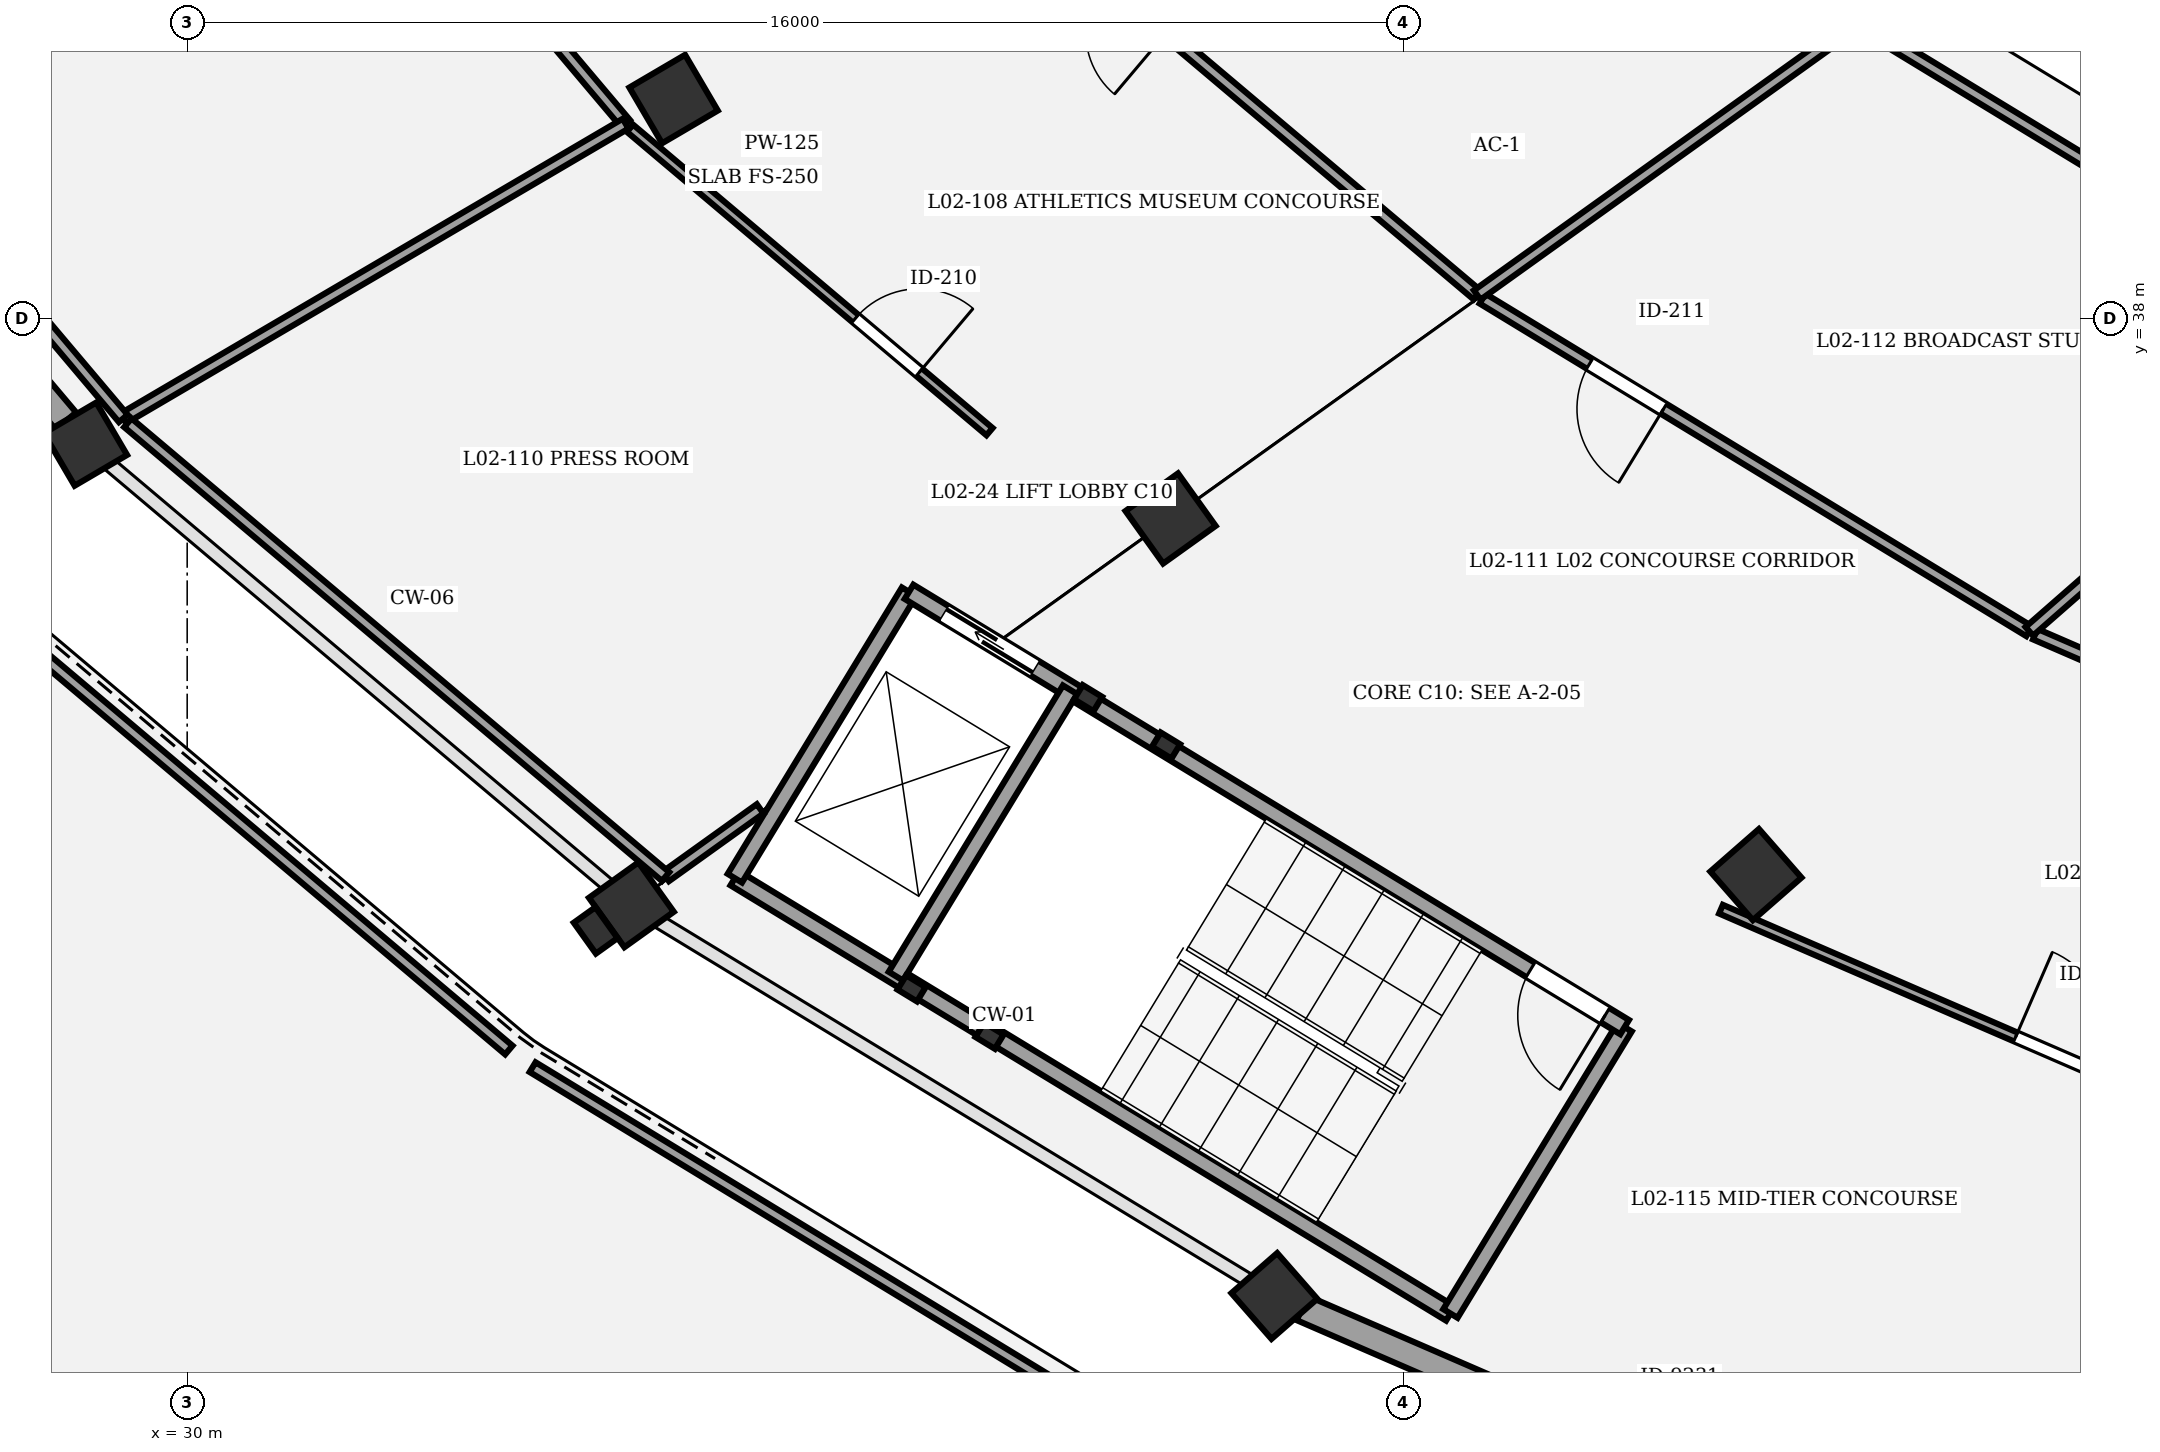
"""IFC4 building model, lengths in metres.
Left out: names, types, materials, properties, quantities, classifications, styles, units other than length and angle.
Written with IfcOpenShell. Run it as: python <this file> out.ifc"""

import sys

from ifc_helpers import new_model, si_unit, direction, frame, frame_2d, origin, origin_2d, place, context, subcontext, project, spatial, rectangle, extrude, element, fill, save


model = new_model("IFC4")
c1 = context("Model", 3, precision=1e-05, world=origin(), true_north=direction((0.0, 1.0)))
c2 = subcontext(c1, "Body", "Model", "MODEL_VIEW")
j1 = project(units=[si_unit("LENGTHUNIT", "METRE"), si_unit("PLANEANGLEUNIT", "RADIAN")], contexts=[c1])
p1 = place(None, origin())
s1 = spatial("IfcSite", under=j1, at=p1, CompositionType="ELEMENT")
p2 = place(p1, origin())
s2 = spatial("IfcBuilding", under=s1, at=p2, CompositionType="ELEMENT")
p3 = place(p2, frame((0.0, 0.0, 10.2)))
s3 = spatial("IfcBuildingStorey", under=s2, at=p3, CompositionType="ELEMENT", Elevation=10.2)
p4 = place(p3, frame((36.4, 40.886, 0.0), z_axis=(0.0, 0.0, 1.0), x_axis=(-0.862513669207, -0.506033764121, 0.0)))
e1 = element("IfcColumn", 1, at=p4, inside=s3, PredefinedType="COLUMN", context=c2, shape_type="SweptSolid", body=[
    extrude(rectangle(XDim=0.85, YDim=0.85, at=origin_2d()), origin(), (0.0, 0.0, 1.0), 4.5),
])
p5 = place(p3, frame((28.662, 36.346, 0.0), z_axis=(0.0, 0.0, 1.0), x_axis=(-0.862513669207, -0.506033764121, 0.0)))
e2 = element("IfcColumn", 2, at=p5, inside=s3, PredefinedType="COLUMN", context=c2, shape_type="SweptSolid", body=[
    extrude(rectangle(XDim=0.8, YDim=0.8, at=origin_2d()), origin(), (0.0, 0.0, 1.0), 4.5),
])
p6 = place(p3, frame((42.939, 35.368, 0.0), z_axis=(0.0, 0.0, 1.0), x_axis=(-0.812897512265, -0.582406760395, 0.0)))
e3 = element("IfcColumn", 3, at=p6, inside=s3, PredefinedType="COLUMN", context=c2, shape_type="SweptSolid", body=[
    extrude(rectangle(XDim=0.85, YDim=0.85, at=origin_2d()), origin(), (0.0, 0.0, 1.0), 4.5),
])
p7 = place(p3, frame((35.844, 30.285, 0.0), z_axis=(0.0, 0.0, 1.0), x_axis=(-0.812897512265, -0.582406760395, 0.0)))
e4 = element("IfcColumn", 4, at=p7, inside=s3, PredefinedType="COLUMN", context=c2, shape_type="SweptSolid", body=[
    extrude(rectangle(XDim=0.8, YDim=0.8, at=origin_2d()), origin(), (0.0, 0.0, 1.0), 4.5),
])
p8 = place(p3, frame((35.375, 29.949, 0.0), z_axis=(0.0, 0.0, 1.0), x_axis=(0.582406760395, -0.812897512265, 0.0)))
e5 = element("IfcColumn", 5, at=p8, inside=s3, PredefinedType="PILASTER", context=c2, shape_type="SweptSolid", body=[
    extrude(rectangle(XDim=0.5, YDim=0.35, at=origin_2d()), origin(), (0.0, 0.0, 1.0), 4.5),
])
p9 = place(p3, frame((50.64, 30.683, 0.0), z_axis=(0.0, 0.0, 1.0), x_axis=(-0.752529860433, -0.658558128912, 0.0)))
e6 = element("IfcColumn", 6, at=p9, inside=s3, PredefinedType="COLUMN", context=c2, shape_type="SweptSolid", body=[
    extrude(rectangle(XDim=0.85, YDim=0.85, at=origin_2d()), origin(), (0.0, 0.0, 1.0), 4.5),
])
p10 = place(p3, frame((44.304, 25.139, 0.0), z_axis=(0.0, 0.0, 1.0), x_axis=(-0.752529860433, -0.658558128912, 0.0)))
e7 = element("IfcColumn", 7, at=p10, inside=s3, PredefinedType="COLUMN", context=c2, shape_type="SweptSolid", body=[
    extrude(rectangle(XDim=0.8, YDim=0.8, at=origin_2d()), origin(), (0.0, 0.0, 1.0), 4.5),
])
p11 = place(p3, frame((23.014, 43.034, 0.0), z_axis=(0.0, 0.0, 1.0), x_axis=(0.64515466323, -0.764052001184, 0.0)))
e8 = element("IfcWall", 8, at=p11, inside=s3, PredefinedType="STANDARD", context=c2, shape_type="SweptSolid", body=[
    extrude(rectangle(XDim=8.355, YDim=0.35, at=frame_2d((4.178, 0.0))), origin(), (0.0, 0.0, 1.0), 3.42),
])
p12 = place(p11, frame((3.348, 0.0, 0.9)))
e9 = element("IfcOpeningElement", 9, at=p12, cuts=e8, PredefinedType="OPENING", context=c2, shape_type="SweptSolid", body=[
    extrude(rectangle(XDim=1.66, YDim=1.95, at=frame_2d((0.83, 0.975))), frame((0.0, 0.185, 0.0), z_axis=(0.0, -1.0, 0.0), x_axis=(1.0, 0.0, 0.0)), (0.0, 0.0, 1.0), 0.37),
])
p13 = place(p3, frame((53.697, 21.067, 0.0), z_axis=(0.0, 0.0, 1.0), x_axis=(-0.917498288986, 0.397739726088, 0.0)))
e10 = element("IfcWall", 10, at=p13, inside=s3, PredefinedType="STANDARD", context=c2, shape_type="SweptSolid", body=[
    extrude(rectangle(XDim=9.84, YDim=0.35, at=frame_2d((4.92, 0.0))), origin(), (0.0, 0.0, 1.0), 3.42),
])
p14 = place(p13, frame((4.02, 0.0, 0.0)))
e11 = element("IfcOpeningElement", 11, at=p14, cuts=e10, PredefinedType="OPENING", context=c2, shape_type="SweptSolid", body=[
    extrude(rectangle(XDim=1.8, YDim=2.4, at=frame_2d((0.9, 1.2))), frame((0.0, 0.185, 0.0), z_axis=(0.0, -1.0, 0.0), x_axis=(1.0, 0.0, 0.0)), (0.0, 0.0, 1.0), 0.37),
])
for number, where, z_axis, x_axis in (
    (12, (42.879, 32.382, 0.0), (0.0, 0.0, 1.0), (-0.854, 0.52, 0.0)),
    (13, (41.854, 33.005, 0.0), (0.0, 0.0, 1.0), (-0.854, 0.52, 0.0)),
    (14, (39.531, 29.186, 0.0), (0.0, 0.0, 1.0), (-0.854, 0.52, 0.0)),
    (15, (40.556, 28.562, 0.0), (0.0, 0.0, 1.0), (-0.854, 0.52, 0.0)),
):
    element("IfcColumn", number, at=place(p3, frame(where, z_axis=z_axis, x_axis=x_axis)), inside=s3, PredefinedType="COLUMN", context=c2, shape_type="SweptSolid", body=[
        extrude(rectangle(XDim=0.3, YDim=0.22, at=origin_2d()), origin(), (0.0, 0.0, 1.0), 4.5),
    ])
p15 = place(p3, frame((46.621, 24.909, 0.0), z_axis=(0.0, 0.0, 1.0), x_axis=(-0.854373055797, 0.519660159651, 0.0)))
e16 = element("IfcWall", 16, at=p15, inside=s3, PredefinedType="SHEAR", context=c2, shape_type="SweptSolid", body=[
    extrude(rectangle(XDim=11.02, YDim=0.22, at=frame_2d((5.51, 0.0))), origin(), (0.0, 0.0, 1.0), 4.25),
])
p16 = place(p3, frame((48.913, 28.677, 0.0), z_axis=(0.0, 0.0, 1.0), x_axis=(-0.519729151243, -0.854331088834, 0.0)))
e17 = element("IfcWall", 17, at=p16, inside=s3, PredefinedType="SHEAR", context=c2, shape_type="SweptSolid", body=[
    extrude(rectangle(XDim=4.41, YDim=0.22, at=frame_2d((2.205, 0.0))), origin(), (0.0, 0.0, 1.0), 4.25),
])
p17 = place(p3, frame((39.497, 34.403, 0.0), z_axis=(0.0, 0.0, 1.0), x_axis=(-0.519664162523, -0.854370621095, 0.0)))
e18 = element("IfcWall", 18, at=p17, inside=s3, PredefinedType="SHEAR", context=c2, shape_type="SweptSolid", body=[
    extrude(rectangle(XDim=4.41, YDim=0.22, at=frame_2d((2.205, 0.0))), origin(), (0.0, 0.0, 1.0), 4.25),
])
p18 = place(p3, frame((48.913, 28.677, 0.0), z_axis=(0.0, 0.0, 1.0), x_axis=(-0.854369202373, 0.51966649501, 0.0)))
e19 = element("IfcWall", 19, at=p18, inside=s3, PredefinedType="SHEAR", context=c2, shape_type="SweptSolid", body=[
    extrude(rectangle(XDim=11.02, YDim=0.22, at=frame_2d((5.51, 0.0))), origin(), (0.0, 0.0, 1.0), 4.25),
])
p19 = place(p18, frame((0.3, 0.0, 0.0)))
e20 = element("IfcOpeningElement", 20, at=p19, cuts=e19, PredefinedType="OPENING", context=c2, shape_type="SweptSolid", body=[
    extrude(rectangle(XDim=1.15, YDim=2.15, at=frame_2d((0.575, 1.075))), frame((0.0, 0.12, 0.0), z_axis=(0.0, -1.0, 0.0), x_axis=(1.0, 0.0, 0.0)), (0.0, 0.0, 1.0), 0.24),
])
p20 = place(p18, frame((9.08, 0.0, 0.0)))
e21 = element("IfcOpeningElement", 21, at=p20, cuts=e19, PredefinedType="OPENING", context=c2, shape_type="SweptSolid", body=[
    extrude(rectangle(XDim=1.4, YDim=2.25, at=frame_2d((0.7, 1.125))), frame((0.0, 0.12, 0.0), z_axis=(0.0, -1.0, 0.0), x_axis=(1.0, 0.0, 0.0)), (0.0, 0.0, 1.0), 0.24),
])
p21 = place(p3, frame((41.616, 33.115, 0.0), z_axis=(0.0, 0.0, 1.0), x_axis=(-0.519664162523, -0.854370621095, 0.0)))
e22 = element("IfcWall", 22, at=p21, inside=s3, PredefinedType="SHEAR", context=c2, shape_type="SweptSolid", body=[
    extrude(rectangle(XDim=4.41, YDim=0.22, at=frame_2d((2.205, 0.0))), origin(), (0.0, 0.0, 1.0), 4.25),
])
p22 = place(p3, frame((30.405, 46.914, 0.0), z_axis=(0.0, 0.0, 1.0), x_axis=(0.64516519871, -0.76404310505, 0.0)))
e23 = element("IfcWall", 23, at=p22, inside=s3, PredefinedType="PARTITIONING", context=c2, shape_type="SweptSolid", body=[
    extrude(rectangle(XDim=8.313, YDim=0.15, at=frame_2d((4.157, 0.0))), origin(), (0.0, 0.0, 1.0), 3.25),
])
p23 = place(p22, frame((3.647, 0.0, 0.0)))
e24 = element("IfcOpeningElement", 24, at=p23, cuts=e23, PredefinedType="OPENING", context=c2, shape_type="SweptSolid", body=[
    extrude(rectangle(XDim=1.02, YDim=2.3, at=frame_2d((0.51, 1.15))), frame((0.0, 0.085, 0.0), z_axis=(0.0, -1.0, 0.0), x_axis=(1.0, 0.0, 0.0)), (0.0, 0.0, 1.0), 0.17),
])
p24 = place(p3, frame((46.973, 38.308, 0.0), z_axis=(0.0, 0.0, 1.0), x_axis=(-0.764249122867, 0.644921141068, 0.0)))
e25 = element("IfcWall", 25, at=p24, inside=s3, PredefinedType="PARTITIONING", context=c2, shape_type="SweptSolid", body=[
    extrude(rectangle(XDim=7.99, YDim=0.15, at=frame_2d((3.995, 0.0))), origin(), (0.0, 0.0, 1.0), 3.25),
])
p25 = place(p24, frame((5.352, 0.0, 0.0)))
e26 = element("IfcOpeningElement", 26, at=p25, cuts=e25, PredefinedType="OPENING", context=c2, shape_type="SweptSolid", body=[
    extrude(rectangle(XDim=1.06, YDim=2.3, at=frame_2d((0.53, 1.15))), frame((0.0, 0.085, 0.0), z_axis=(0.0, -1.0, 0.0), x_axis=(1.0, 0.0, 0.0)), (0.0, 0.0, 1.0), 0.17),
])
p26 = place(p3, frame((35.825, 40.503, 0.0), z_axis=(0.0, 0.0, 1.0), x_axis=(0.764269616674, -0.644896854565, 0.0)))
e27 = element("IfcWall", 27, at=p26, inside=s3, PredefinedType="PARTITIONING", context=c2, shape_type="SweptSolid", body=[
    extrude(rectangle(XDim=6.191, YDim=0.125, at=frame_2d((3.095, 0.0))), origin(), (0.0, 0.0, 1.0), 3.25),
])
p27 = place(p26, frame((3.881, 0.0, 0.0)))
e28 = element("IfcOpeningElement", 28, at=p27, cuts=e27, PredefinedType="OPENING", context=c2, shape_type="SweptSolid", body=[
    extrude(rectangle(XDim=1.1, YDim=2.3, at=frame_2d((0.55, 1.15))), frame((0.0, 0.073, 0.0), z_axis=(0.0, -1.0, 0.0), x_axis=(1.0, 0.0, 0.0)), (0.0, 0.0, 1.0), 0.145),
])
p28 = place(p3, frame((54.237, 33.884, 0.0), z_axis=(0.0, 0.0, 1.0), x_axis=(-0.854330104408, 0.519730769439, 0.0)))
e29 = element("IfcWall", 29, at=p28, inside=s3, PredefinedType="PARTITIONING", context=c2, shape_type="SweptSolid", body=[
    extrude(rectangle(XDim=8.42, YDim=0.15, at=frame_2d((4.21, 0.0))), origin(), (0.0, 0.0, 1.0), 3.25),
])
p29 = place(p28, frame((5.632, 0.0, 0.0)))
e30 = element("IfcOpeningElement", 30, at=p29, cuts=e29, PredefinedType="OPENING", context=c2, shape_type="SweptSolid", body=[
    extrude(rectangle(XDim=1.14, YDim=2.3, at=frame_2d((0.57, 1.15))), frame((0.0, 0.085, 0.0), z_axis=(0.0, -1.0, 0.0), x_axis=(1.0, 0.0, 0.0)), (0.0, 0.0, 1.0), 0.17),
])
p30 = place(p3, frame((62.618, 30.247, 0.0), z_axis=(0.0, 0.0, 1.0), x_axis=(-0.917494590455, 0.397748257677, 0.0)))
e31 = element("IfcWall", 31, at=p30, inside=s3, PredefinedType="PARTITIONING", context=c2, shape_type="SweptSolid", body=[
    extrude(rectangle(XDim=9.049, YDim=0.15, at=frame_2d((4.525, 0.0))), origin(), (0.0, 0.0, 1.0), 3.25),
])
p31 = place(p30, frame((6.104, 0.0, 0.0)))
e32 = element("IfcOpeningElement", 32, at=p31, cuts=e31, PredefinedType="OPENING", context=c2, shape_type="SweptSolid", body=[
    extrude(rectangle(XDim=1.18, YDim=2.3, at=frame_2d((0.59, 1.15))), frame((0.0, 0.085, 0.0), z_axis=(0.0, -1.0, 0.0), x_axis=(1.0, 0.0, 0.0)), (0.0, 0.0, 1.0), 0.17),
])
p32 = place(p3, frame((50.18, 30.228, 0.0), z_axis=(0.0, 0.0, 1.0), x_axis=(0.917508957037, -0.39771511633, 0.0)))
e33 = element("IfcWall", 33, at=p32, inside=s3, PredefinedType="PARTITIONING", context=c2, shape_type="SweptSolid", body=[
    extrude(rectangle(XDim=9.671, YDim=0.125, at=frame_2d((4.836, 0.0))), origin(), (0.0, 0.0, 1.0), 3.25),
])
p33 = place(p32, frame((4.226, 0.0, 0.0)))
e34 = element("IfcOpeningElement", 34, at=p33, cuts=e33, PredefinedType="OPENING", context=c2, shape_type="SweptSolid", body=[
    extrude(rectangle(XDim=1.22, YDim=2.3, at=frame_2d((0.61, 1.15))), frame((0.0, 0.073, 0.0), z_axis=(0.0, -1.0, 0.0), x_axis=(1.0, 0.0, 0.0)), (0.0, 0.0, 1.0), 0.145),
])
p34 = place(p3, frame((35.768, 40.562, 0.0), z_axis=(0.0, 0.0, 1.0), x_axis=(-0.862520085009, -0.506022828492, 0.0)))
e35 = element("IfcWall", 35, at=p34, inside=s3, PredefinedType="PARTITIONING", context=c2, shape_type="SweptSolid", body=[
    extrude(rectangle(XDim=7.663, YDim=0.15, at=frame_2d((3.831, 0.0))), origin(), (0.0, 0.0, 1.0), 3.25),
])
p35 = place(p3, frame((29.159, 36.685, 0.0), z_axis=(0.0, 0.0, 1.0), x_axis=(-0.645166061073, 0.764042376861, 0.0)))
e36 = element("IfcWall", 36, at=p35, inside=s3, PredefinedType="PARTITIONING", context=c2, shape_type="SweptSolid", body=[
    extrude(rectangle(XDim=9.014, YDim=0.15, at=frame_2d((4.507, 0.0))), origin(), (0.0, 0.0, 1.0), 3.25),
])
p36 = place(p3, frame((54.0, 43.343, 0.0), z_axis=(0.0, 0.0, 1.0), x_axis=(-0.812881530735, -0.582429066058, 0.0)))
e37 = element("IfcWall", 37, at=p36, inside=s3, PredefinedType="PARTITIONING", context=c2, shape_type="SweptSolid", body=[
    extrude(rectangle(XDim=8.645, YDim=0.15, at=frame_2d((4.322, 0.0))), origin(), (0.0, 0.0, 1.0), 3.25),
])
p37 = place(p3, frame((37.538, 31.548, 0.0), z_axis=(0.0, 0.0, 1.0), x_axis=(-0.812848600764, -0.582475022844, 0.0)))
e38 = element("IfcWall", 38, at=p37, inside=s3, PredefinedType="PARTITIONING", context=c2, shape_type="SweptSolid", body=[
    extrude(rectangle(XDim=1.53, YDim=0.15, at=frame_2d((0.765, 0.0))), origin(), (0.0, 0.0, 1.0), 3.25),
])
p38 = place(p3, frame((36.294, 30.657, 0.0), z_axis=(0.0, 0.0, 1.0), x_axis=(-0.764252893528, 0.644916672706, 0.0)))
e39 = element("IfcWall", 39, at=p38, inside=s3, PredefinedType="PARTITIONING", context=c2, shape_type="SweptSolid", body=[
    extrude(rectangle(XDim=9.257, YDim=0.15, at=frame_2d((4.629, 0.0))), origin(), (0.0, 0.0, 1.0), 3.25),
])
p39 = place(p3, frame((52.051, 41.848, 0.0), z_axis=(0.0, 0.0, 1.0), x_axis=(0.854328586702, -0.519733264226, 0.0)))
e40 = element("IfcWall", 40, at=p39, inside=s3, PredefinedType="PARTITIONING", context=c2, shape_type="SweptSolid", body=[
    extrude(rectangle(XDim=7.793, YDim=0.15, at=frame_2d((3.897, 0.0))), origin(), (0.0, 0.0, 1.0), 3.25),
])
p40 = place(p3, frame((58.709, 37.797, 0.0), z_axis=(0.0, 0.0, 1.0), x_axis=(-0.752543608061, -0.658542419261, 0.0)))
e41 = element("IfcWall", 41, at=p40, inside=s3, PredefinedType="PARTITIONING", context=c2, shape_type="SweptSolid", body=[
    extrude(rectangle(XDim=5.942, YDim=0.15, at=frame_2d((2.971, 0.0))), origin(), (0.0, 0.0, 1.0), 3.25),
])
p41 = place(p3, frame((59.054, 26.381, 0.0), z_axis=(0.0, 0.0, 1.0), x_axis=(-0.677844539823, -0.735205263741, 0.0)))
e42 = element("IfcWall", 42, at=p41, inside=s3, PredefinedType="PARTITIONING", context=c2, shape_type="SweptSolid", body=[
    extrude(rectangle(XDim=6.87, YDim=0.15, at=frame_2d((3.435, 0.0))), origin(), (0.0, 0.0, 1.0), 3.25),
])
p42 = place(p3, frame((27.049, 34.436, 0.0), z_axis=(0.0, 0.0, 1.0), x_axis=(0.76426547638, -0.644901761212, 0.0)))
e43 = element("IfcWall", 43, at=p42, inside=s3, PredefinedType="PARTITIONING", context=c2, shape_type="SweptSolid", body=[
    extrude(rectangle(XDim=9.398, YDim=0.15, at=frame_2d((4.699, 0.0))), origin(), (0.0, 0.0, 1.0), 3.25),
])
p43 = place(p3, frame((34.545, 28.15, 0.0), z_axis=(0.0, 0.0, 1.0), x_axis=(0.854333268174, -0.519725568826, 0.0)))
e44 = element("IfcWall", 44, at=p43, inside=s3, PredefinedType="PARTITIONING", context=c2, shape_type="SweptSolid", body=[
    extrude(rectangle(XDim=9.902, YDim=0.15, at=frame_2d((4.951, 0.0))), origin(), (0.0, 0.0, 1.0), 3.25),
])
p44 = place(p19, origin())
e45 = element("IfcDoor", 45, at=p44, inside=s3, OperationType="SINGLE_SWING_LEFT", PredefinedType="DOOR", context=c2, shape_type="SweptSolid", body=[
    extrude(rectangle(XDim=1.15, YDim=2.15, at=frame_2d((0.575, 1.075))), frame((0.0, 0.025, 0.0), z_axis=(0.0, -1.0, 0.0), x_axis=(1.0, 0.0, 0.0)), (0.0, 0.0, 1.0), 0.05),
])
fill(e20, e45)
p45 = place(p20, origin())
e46 = element("IfcDoor", 46, at=p45, inside=s3, OperationType="DOUBLE_DOOR_SLIDING", PredefinedType="DOOR", context=c2, shape_type="SweptSolid", body=[
    extrude(rectangle(XDim=1.4, YDim=2.25, at=frame_2d((0.7, 1.125))), frame((0.0, 0.025, 0.0), z_axis=(0.0, -1.0, 0.0), x_axis=(1.0, 0.0, 0.0)), (0.0, 0.0, 1.0), 0.05),
])
fill(e21, e46)
p46 = place(p27, origin())
e47 = element("IfcDoor", 47, at=p46, inside=s3, OperationType="SINGLE_SWING_RIGHT", PredefinedType="DOOR", context=c2, shape_type="SweptSolid", body=[
    extrude(rectangle(XDim=1.1, YDim=2.3, at=frame_2d((0.55, 1.15))), frame((0.0, 0.025, 0.0), z_axis=(0.0, -1.0, 0.0), x_axis=(1.0, 0.0, 0.0)), (0.0, 0.0, 1.0), 0.05),
])
fill(e28, e47)
p47 = place(p29, origin())
e48 = element("IfcDoor", 48, at=p47, inside=s3, OperationType="SINGLE_SWING_LEFT", PredefinedType="DOOR", context=c2, shape_type="SweptSolid", body=[
    extrude(rectangle(XDim=1.14, YDim=2.3, at=frame_2d((0.57, 1.15))), frame((0.0, 0.025, 0.0), z_axis=(0.0, -1.0, 0.0), x_axis=(1.0, 0.0, 0.0)), (0.0, 0.0, 1.0), 0.05),
])
fill(e30, e48)
p48 = place(p33, origin())
e49 = element("IfcDoor", 49, at=p48, inside=s3, OperationType="SINGLE_SWING_LEFT", PredefinedType="DOOR", context=c2, shape_type="SweptSolid", body=[
    extrude(rectangle(XDim=1.22, YDim=2.3, at=frame_2d((0.61, 1.15))), frame((0.0, 0.025, 0.0), z_axis=(0.0, -1.0, 0.0), x_axis=(1.0, 0.0, 0.0)), (0.0, 0.0, 1.0), 0.05),
])
fill(e34, e49)
save(model, sys.argv[1])
